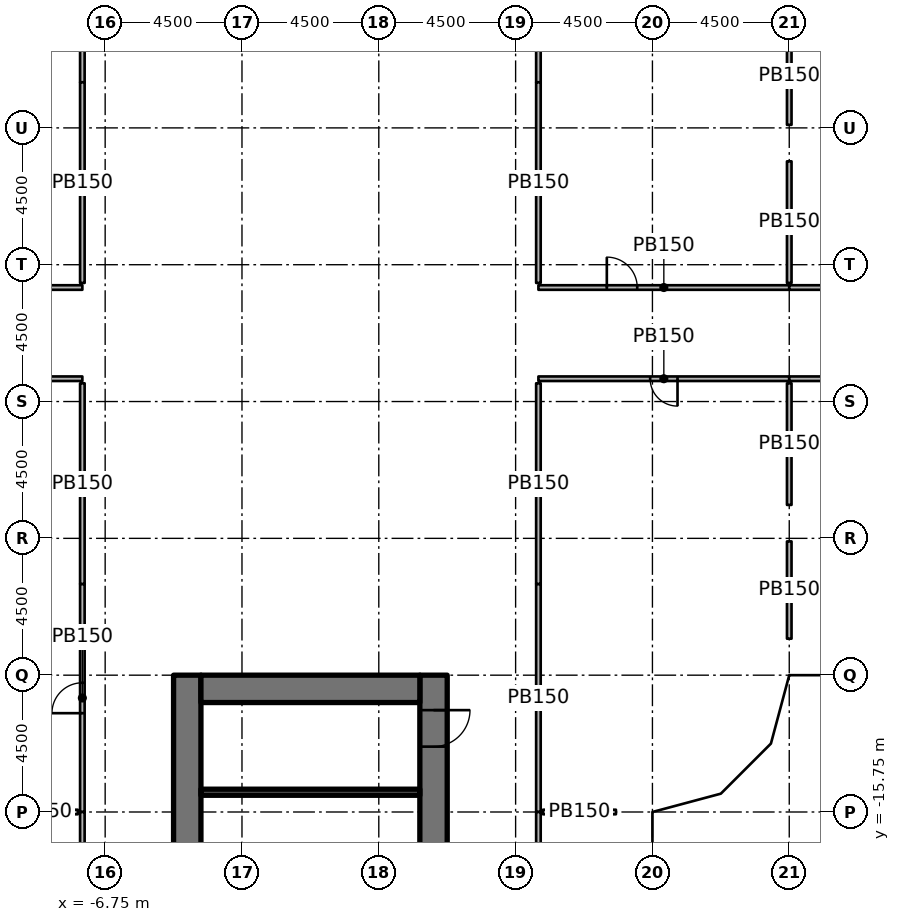
"""IFC4 building model, lengths in metres.
Left out: names, types, materials, properties, quantities, classifications, styles, units other than length and angle.
Written with IfcOpenShell. Run it as: python <this file> out.ifc"""

import sys

from ifc_helpers import new_model, si_unit, direction, frame, frame_2d, origin, origin_2d, place, context, subcontext, project, spatial, rectangle, extrude, element, fill, save


model = new_model("IFC4")
c1 = context("Model", 3, precision=1e-05, world=origin(), true_north=direction((0.0, 1.0)))
c2 = subcontext(c1, "Body", "Model", "MODEL_VIEW")
j1 = project(units=[si_unit("LENGTHUNIT", "METRE"), si_unit("PLANEANGLEUNIT", "RADIAN")], contexts=[c1])
p1 = place(None, origin())
s1 = spatial("IfcSite", under=j1, at=p1, CompositionType="ELEMENT")
p2 = place(p1, origin())
s2 = spatial("IfcBuilding", under=s1, at=p2, CompositionType="ELEMENT")
p3 = place(p2, frame((0.0, 0.0, 22.0)))
s3 = spatial("IfcBuildingStorey", under=s2, at=p3, CompositionType="ELEMENT", Elevation=22.0)
for number, where, z_axis, x_axis in (
    (1, (-6.25, -15.75, 0.0), (0.0, 0.0, 1.0), (1.0, 0.0, 0.0)),
    (2, (-6.25, -10.75, 0.0), (0.0, 0.0, 1.0), (1.0, 0.0, 0.0)),
    (3, (-6.25, -6.25, 0.0), (0.0, 0.0, 1.0), (1.0, 0.0, 0.0)),
    (4, (-6.25, 6.25, 0.0), (0.0, 0.0, 1.0), (1.0, 0.0, 0.0)),
    (5, (6.25, -15.75, 0.0), (0.0, 0.0, 1.0), (1.0, 0.0, 0.0)),
    (6, (6.25, -10.75, 0.0), (0.0, 0.0, 1.0), (1.0, 0.0, 0.0)),
    (7, (6.25, -6.25, 0.0), (0.0, 0.0, 1.0), (1.0, 0.0, 0.0)),
    (8, (6.25, 6.25, 0.0), (0.0, 0.0, 1.0), (1.0, 0.0, 0.0)),
):
    element("IfcColumn", number, at=place(p3, frame(where, z_axis=z_axis, x_axis=x_axis)), inside=s3, PredefinedType="COLUMN", context=c2, shape_type="SweptSolid", body=[
        extrude(rectangle(XDim=1.2, YDim=1.2, at=origin_2d()), origin(), (0.0, 0.0, 1.0), 4.85),
    ])
p4 = place(p3, frame((10.65, -15.15, 0.0), z_axis=(0.0, 0.0, 1.0), x_axis=(1.0, 0.0, 0.0)))
e9 = element("IfcColumn", 9, at=p4, inside=s3, PredefinedType="COLUMN", context=c2, shape_type="SweptSolid", body=[
    extrude(rectangle(XDim=1.2, YDim=1.2, at=origin_2d()), origin(), (0.0, 0.0, 1.0), 4.55),
])
for number, where, z_axis, x_axis in (
    (10, (10.75, -6.25, 0.0), (0.0, 0.0, 1.0), (1.0, 0.0, 0.0)),
    (11, (10.75, 6.25, 0.0), (0.0, 0.0, 1.0), (1.0, 0.0, 0.0)),
):
    element("IfcColumn", number, at=place(p3, frame(where, z_axis=z_axis, x_axis=x_axis)), inside=s3, PredefinedType="COLUMN", context=c2, shape_type="SweptSolid", body=[
        extrude(rectangle(XDim=1.2, YDim=1.2, at=origin_2d()), origin(), (0.0, 0.0, 1.0), 4.85),
    ])
p5 = place(p3, frame((15.15, -10.65, 0.0), z_axis=(0.0, 0.0, 1.0), x_axis=(1.0, 0.0, 0.0)))
e12 = element("IfcColumn", 12, at=p5, inside=s3, PredefinedType="COLUMN", context=c2, shape_type="SweptSolid", body=[
    extrude(rectangle(XDim=1.2, YDim=1.2, at=origin_2d()), origin(), (0.0, 0.0, 1.0), 4.55),
])
for number, where, z_axis, x_axis in (
    (13, (15.75, -6.25, 0.0), (0.0, 0.0, 1.0), (1.0, 0.0, 0.0)),
    (14, (15.75, 6.25, 0.0), (0.0, 0.0, 1.0), (1.0, 0.0, 0.0)),
):
    element("IfcColumn", number, at=place(p3, frame(where, z_axis=z_axis, x_axis=x_axis)), inside=s3, PredefinedType="COLUMN", context=c2, shape_type="SweptSolid", body=[
        extrude(rectangle(XDim=1.2, YDim=1.2, at=origin_2d()), origin(), (0.0, 0.0, 1.0), 4.85),
    ])
p6 = place(p3, frame((-4.05, -11.25, 0.0), z_axis=(0.0, 0.0, 1.0), x_axis=(0.0, -1.0, 0.0)))
e15 = element("IfcWall", 15, at=p6, inside=s3, PredefinedType="SHEAR", context=c2, shape_type="SweptSolid", body=[
    extrude(rectangle(XDim=15.0, YDim=0.9, at=frame_2d((7.5, 0.0))), origin(), (0.0, 0.0, 1.0), 5.0),
])
p7 = place(p6, frame((7.15, 0.0, 0.0)))
e16 = element("IfcOpeningElement", 16, at=p7, cuts=e15, PredefinedType="OPENING", context=c2, shape_type="SweptSolid", body=[
    extrude(rectangle(XDim=1.5, YDim=2.3, at=frame_2d((0.75, 1.15))), frame((0.0, 0.46, 0.0), z_axis=(0.0, -1.0, 0.0), x_axis=(1.0, 0.0, 0.0)), (0.0, 0.0, 1.0), 0.92),
])
p8 = place(p6, frame((5.55, 0.0, 0.0)))
e17 = element("IfcOpeningElement", 17, at=p8, cuts=e15, PredefinedType="OPENING", context=c2, shape_type="SweptSolid", body=[
    extrude(rectangle(XDim=1.2, YDim=2.1, at=frame_2d((0.6, 1.05))), frame((0.0, 0.46, 0.0), z_axis=(0.0, -1.0, 0.0), x_axis=(1.0, 0.0, 0.0)), (0.0, 0.0, 1.0), 0.92),
])
p9 = place(p3, frame((4.05, -11.25, 0.0), z_axis=(0.0, 0.0, 1.0), x_axis=(0.0, -1.0, 0.0)))
e18 = element("IfcWall", 18, at=p9, inside=s3, PredefinedType="SHEAR", context=c2, shape_type="SweptSolid", body=[
    extrude(rectangle(XDim=15.0, YDim=0.9, at=frame_2d((7.5, 0.0))), origin(), (0.0, 0.0, 1.0), 5.0),
])
p10 = place(p9, frame((7.15, 0.0, 0.0)))
e19 = element("IfcOpeningElement", 19, at=p10, cuts=e18, PredefinedType="OPENING", context=c2, shape_type="SweptSolid", body=[
    extrude(rectangle(XDim=1.5, YDim=2.3, at=frame_2d((0.75, 1.15))), frame((0.0, 0.46, 0.0), z_axis=(0.0, -1.0, 0.0), x_axis=(1.0, 0.0, 0.0)), (0.0, 0.0, 1.0), 0.92),
])
p11 = place(p9, frame((13.9, 0.0, 0.0)))
e20 = element("IfcOpeningElement", 20, at=p11, cuts=e18, PredefinedType="OPENING", context=c2, shape_type="SweptSolid", body=[
    extrude(rectangle(XDim=0.9, YDim=2.1, at=frame_2d((0.45, 1.05))), frame((0.0, 0.46, 0.0), z_axis=(0.0, -1.0, 0.0), x_axis=(1.0, 0.0, 0.0)), (0.0, 0.0, 1.0), 0.92),
])
p12 = place(p9, frame((1.15, 0.0, 0.0)))
e21 = element("IfcOpeningElement", 21, at=p12, cuts=e18, PredefinedType="OPENING", context=c2, shape_type="SweptSolid", body=[
    extrude(rectangle(XDim=1.2, YDim=2.1, at=frame_2d((0.6, 1.05))), frame((0.0, 0.46, 0.0), z_axis=(0.0, -1.0, 0.0), x_axis=(1.0, 0.0, 0.0)), (0.0, 0.0, 1.0), 0.92),
])
p13 = place(p3, frame((-3.6, -11.7, 0.0), z_axis=(0.0, 0.0, 1.0), x_axis=(1.0, 0.0, 0.0)))
e22 = element("IfcWall", 22, at=p13, inside=s3, PredefinedType="SHEAR", context=c2, shape_type="SweptSolid", body=[
    extrude(rectangle(XDim=7.2, YDim=0.9, at=frame_2d((3.6, 0.0))), origin(), (0.0, 0.0, 1.0), 5.0),
])
p14 = place(p3, frame((3.6, -15.1, 0.0), z_axis=(0.0, 0.0, 1.0), x_axis=(-1.0, 0.0, 0.0)))
e23 = element("IfcWall", 23, at=p14, inside=s3, PredefinedType="SHEAR", context=c2, shape_type="SweptSolid", body=[
    extrude(rectangle(XDim=7.2, YDim=0.2, at=frame_2d((3.6, 0.0))), origin(), (0.0, 0.0, 1.0), 4.85),
])
p15 = place(p3, frame((7.5, 15.75, 0.0), z_axis=(0.0, 0.0, 1.0), x_axis=(0.0, -1.0, 0.0)))
e24 = element("IfcWall", 24, at=p15, inside=s3, PredefinedType="PARTITIONING", context=c2, shape_type="SweptSolid", body=[
    extrude(rectangle(XDim=7.5, YDim=0.15, at=frame_2d((3.75, 0.0))), origin(), (0.0, 0.0, 1.0), 3.93),
])
p16 = place(p15, frame((3.25, 0.0, 0.0)))
e25 = element("IfcOpeningElement", 25, at=p16, cuts=e24, PredefinedType="OPENING", context=c2, shape_type="SweptSolid", body=[
    extrude(rectangle(XDim=1.0, YDim=2.1, at=frame_2d((0.5, 1.05))), frame((0.0, 0.085, 0.0), z_axis=(0.0, -1.0, 0.0), x_axis=(1.0, 0.0, 0.0)), (0.0, 0.0, 1.0), 0.17),
])
p17 = place(p3, frame((-7.5, 8.25, 0.0), z_axis=(0.0, 0.0, 1.0), x_axis=(0.0, 1.0, 0.0)))
e26 = element("IfcWall", 26, at=p17, inside=s3, PredefinedType="PARTITIONING", context=c2, shape_type="SweptSolid", body=[
    extrude(rectangle(XDim=7.5, YDim=0.15, at=frame_2d((3.75, 0.0))), origin(), (0.0, 0.0, 1.0), 3.93),
])
p18 = place(p17, frame((4.5, 0.0, 0.0)))
e27 = element("IfcOpeningElement", 27, at=p18, cuts=e26, PredefinedType="OPENING", context=c2, shape_type="SweptSolid", body=[
    extrude(rectangle(XDim=1.0, YDim=2.1, at=frame_2d((0.5, 1.05))), frame((0.0, 0.085, 0.0), z_axis=(0.0, -1.0, 0.0), x_axis=(1.0, 0.0, 0.0)), (0.0, 0.0, 1.0), 0.17),
])
p19 = place(p3, frame((7.5, -8.25, 0.0), z_axis=(0.0, 0.0, 1.0), x_axis=(0.0, -1.0, 0.0)))
e28 = element("IfcWall", 28, at=p19, inside=s3, PredefinedType="PARTITIONING", context=c2, shape_type="SweptSolid", body=[
    extrude(rectangle(XDim=7.5, YDim=0.15, at=frame_2d((3.75, 0.0))), origin(), (0.0, 0.0, 1.0), 3.93),
])
p20 = place(p3, frame((7.5, -15.75, 0.0), z_axis=(0.0, 0.0, 1.0), x_axis=(0.0, -1.0, 0.0)))
e29 = element("IfcWall", 29, at=p20, inside=s3, PredefinedType="PARTITIONING", context=c2, shape_type="SweptSolid", body=[
    extrude(rectangle(XDim=16.5, YDim=0.15, at=frame_2d((8.25, 0.0))), origin(), (0.0, 0.0, 1.0), 4.55),
])
p21 = place(p20, frame((7.25, 0.0, 0.0)))
e30 = element("IfcOpeningElement", 30, at=p21, cuts=e29, PredefinedType="OPENING", context=c2, shape_type="SweptSolid", body=[
    extrude(rectangle(XDim=0.9, YDim=2.1, at=frame_2d((0.45, 1.05))), frame((0.0, 0.085, 0.0), z_axis=(0.0, -1.0, 0.0), x_axis=(1.0, 0.0, 0.0)), (0.0, 0.0, 1.0), 0.17),
])
p22 = place(p3, frame((-7.5, -15.75, 0.0), z_axis=(0.0, 0.0, 1.0), x_axis=(0.0, 1.0, 0.0)))
e31 = element("IfcWall", 31, at=p22, inside=s3, PredefinedType="PARTITIONING", context=c2, shape_type="SweptSolid", body=[
    extrude(rectangle(XDim=7.5, YDim=0.15, at=frame_2d((3.75, 0.0))), origin(), (0.0, 0.0, 1.0), 3.93),
])
p23 = place(p22, frame((3.25, 0.0, 0.0)))
e32 = element("IfcOpeningElement", 32, at=p23, cuts=e31, PredefinedType="OPENING", context=c2, shape_type="SweptSolid", body=[
    extrude(rectangle(XDim=1.0, YDim=2.1, at=frame_2d((0.5, 1.05))), frame((0.0, 0.085, 0.0), z_axis=(0.0, -1.0, 0.0), x_axis=(1.0, 0.0, 0.0)), (0.0, 0.0, 1.0), 0.17),
])
p24 = place(p3, frame((-7.5, -32.25, 0.0), z_axis=(0.0, 0.0, 1.0), x_axis=(0.0, 1.0, 0.0)))
e33 = element("IfcWall", 33, at=p24, inside=s3, PredefinedType="PARTITIONING", context=c2, shape_type="SweptSolid", body=[
    extrude(rectangle(XDim=16.5, YDim=0.15, at=frame_2d((8.25, 0.0))), origin(), (0.0, 0.0, 1.0), 4.55),
])
p25 = place(p24, frame((8.25, 0.0, 0.0)))
e34 = element("IfcOpeningElement", 34, at=p25, cuts=e33, PredefinedType="OPENING", context=c2, shape_type="SweptSolid", body=[
    extrude(rectangle(XDim=0.9, YDim=2.1, at=frame_2d((0.45, 1.05))), frame((0.0, 0.085, 0.0), z_axis=(0.0, -1.0, 0.0), x_axis=(1.0, 0.0, 0.0)), (0.0, 0.0, 1.0), 0.17),
])
p26 = place(p3, frame((7.5, 1.5, 0.0), z_axis=(0.0, 0.0, 1.0), x_axis=(1.0, 0.0, 0.0)))
e35 = element("IfcWall", 35, at=p26, inside=s3, PredefinedType="PARTITIONING", context=c2, shape_type="SweptSolid", body=[
    extrude(rectangle(XDim=8.25, YDim=0.15, at=frame_2d((4.125, 0.0))), origin(), (0.0, 0.0, 1.0), 4.063),
])
p27 = place(p26, frame((2.25, 0.0, 0.0)))
e36 = element("IfcOpeningElement", 36, at=p27, cuts=e35, PredefinedType="OPENING", context=c2, shape_type="SweptSolid", body=[
    extrude(rectangle(XDim=1.0, YDim=2.1, at=frame_2d((0.5, 1.05))), frame((0.0, 0.085, 0.0), z_axis=(0.0, -1.0, 0.0), x_axis=(1.0, 0.0, 0.0)), (0.0, 0.0, 1.0), 0.17),
])
p28 = place(p3, frame((15.75, 1.5, 0.0), z_axis=(0.0, 0.0, 1.0), x_axis=(1.0, 0.0, 0.0)))
e37 = element("IfcWall", 37, at=p28, inside=s3, PredefinedType="PARTITIONING", context=c2, shape_type="SweptSolid", body=[
    extrude(rectangle(XDim=21.9, YDim=0.15, at=frame_2d((10.95, 0.0))), origin(), (0.0, 0.0, 1.0), 3.93),
])
p29 = place(p28, frame((10.8, 0.0, 0.0)))
e38 = element("IfcOpeningElement", 38, at=p29, cuts=e37, PredefinedType="OPENING", context=c2, shape_type="SweptSolid", body=[
    extrude(rectangle(XDim=0.9, YDim=2.1, at=frame_2d((0.45, 1.05))), frame((0.0, 0.085, 0.0), z_axis=(0.0, -1.0, 0.0), x_axis=(1.0, 0.0, 0.0)), (0.0, 0.0, 1.0), 0.17),
])
p30 = place(p3, frame((15.75, -1.5, 0.0), z_axis=(0.0, 0.0, 1.0), x_axis=(-1.0, 0.0, 0.0)))
e39 = element("IfcWall", 39, at=p30, inside=s3, PredefinedType="PARTITIONING", context=c2, shape_type="SweptSolid", body=[
    extrude(rectangle(XDim=8.25, YDim=0.15, at=frame_2d((4.125, 0.0))), origin(), (0.0, 0.0, 1.0), 4.063),
])
p31 = place(p30, frame((3.675, 0.0, 0.0)))
e40 = element("IfcOpeningElement", 40, at=p31, cuts=e39, PredefinedType="OPENING", context=c2, shape_type="SweptSolid", body=[
    extrude(rectangle(XDim=0.9, YDim=2.1, at=frame_2d((0.45, 1.05))), frame((0.0, 0.085, 0.0), z_axis=(0.0, -1.0, 0.0), x_axis=(1.0, 0.0, 0.0)), (0.0, 0.0, 1.0), 0.17),
])
p32 = place(p3, frame((37.65, -1.5, 0.0), z_axis=(0.0, 0.0, 1.0), x_axis=(-1.0, 0.0, 0.0)))
e41 = element("IfcWall", 41, at=p32, inside=s3, PredefinedType="PARTITIONING", context=c2, shape_type="SweptSolid", body=[
    extrude(rectangle(XDim=21.9, YDim=0.15, at=frame_2d((10.95, 0.0))), origin(), (0.0, 0.0, 1.0), 3.93),
])
p33 = place(p32, frame((10.2, 0.0, 0.0)))
e42 = element("IfcOpeningElement", 42, at=p33, cuts=e41, PredefinedType="OPENING", context=c2, shape_type="SweptSolid", body=[
    extrude(rectangle(XDim=0.9, YDim=2.1, at=frame_2d((0.45, 1.05))), frame((0.0, 0.085, 0.0), z_axis=(0.0, -1.0, 0.0), x_axis=(1.0, 0.0, 0.0)), (0.0, 0.0, 1.0), 0.17),
])
p34 = place(p3, frame((-15.75, 1.5, 0.0), z_axis=(0.0, 0.0, 1.0), x_axis=(1.0, 0.0, 0.0)))
e43 = element("IfcWall", 43, at=p34, inside=s3, PredefinedType="PARTITIONING", context=c2, shape_type="SweptSolid", body=[
    extrude(rectangle(XDim=8.25, YDim=0.15, at=frame_2d((4.125, 0.0))), origin(), (0.0, 0.0, 1.0), 4.063),
])
p35 = place(p34, frame((2.25, 0.0, 0.0)))
e44 = element("IfcOpeningElement", 44, at=p35, cuts=e43, PredefinedType="OPENING", context=c2, shape_type="SweptSolid", body=[
    extrude(rectangle(XDim=1.0, YDim=2.1, at=frame_2d((0.5, 1.05))), frame((0.0, 0.085, 0.0), z_axis=(0.0, -1.0, 0.0), x_axis=(1.0, 0.0, 0.0)), (0.0, 0.0, 1.0), 0.17),
])
p36 = place(p3, frame((-7.5, -1.5, 0.0), z_axis=(0.0, 0.0, 1.0), x_axis=(-1.0, 0.0, 0.0)))
e45 = element("IfcWall", 45, at=p36, inside=s3, PredefinedType="PARTITIONING", context=c2, shape_type="SweptSolid", body=[
    extrude(rectangle(XDim=8.25, YDim=0.15, at=frame_2d((4.125, 0.0))), origin(), (0.0, 0.0, 1.0), 4.063),
])
p37 = place(p36, frame((2.25, 0.0, 0.0)))
e46 = element("IfcOpeningElement", 46, at=p37, cuts=e45, PredefinedType="OPENING", context=c2, shape_type="SweptSolid", body=[
    extrude(rectangle(XDim=1.0, YDim=2.1, at=frame_2d((0.5, 1.05))), frame((0.0, 0.085, 0.0), z_axis=(0.0, -1.0, 0.0), x_axis=(1.0, 0.0, 0.0)), (0.0, 0.0, 1.0), 0.17),
])
p38 = place(p3, frame((15.75, 10.05, 0.0), z_axis=(0.0, 0.0, 1.0), x_axis=(0.0, -1.0, 0.0)))
e47 = element("IfcWall", 47, at=p38, inside=s3, PredefinedType="PARTITIONING", context=c2, shape_type="SweptSolid", body=[
    extrude(rectangle(XDim=3.2, YDim=0.15, at=frame_2d((1.6, 0.0))), origin(), (0.0, 0.0, 1.0), 4.55),
])
p39 = place(p3, frame((15.75, 5.65, 0.0), z_axis=(0.0, 0.0, 1.0), x_axis=(0.0, -1.0, 0.0)))
e48 = element("IfcWall", 48, at=p39, inside=s3, PredefinedType="PARTITIONING", context=c2, shape_type="SweptSolid", body=[
    extrude(rectangle(XDim=4.0, YDim=0.15, at=frame_2d((2.0, 0.0))), origin(), (0.0, 0.0, 1.0), 4.063),
])
for number, where, z_axis, x_axis in (
    (49, (7.5, 1.65, 0.0), (0.0, 0.0, 1.0), (0.0, 1.0, 0.0)),
    (50, (-7.5, 8.25, 0.0), (0.0, 0.0, 1.0), (0.0, -1.0, 0.0)),
):
    element("IfcWall", number, at=place(p3, frame(where, z_axis=z_axis, x_axis=x_axis)), inside=s3, PredefinedType="PARTITIONING", context=c2, shape_type="SweptSolid", body=[
        extrude(rectangle(XDim=6.6, YDim=0.15, at=frame_2d((3.3, 0.0))), origin(), (0.0, 0.0, 1.0), 3.911),
    ])
p40 = place(p3, frame((15.75, -1.65, 0.0), z_axis=(0.0, 0.0, 1.0), x_axis=(0.0, -1.0, 0.0)))
e51 = element("IfcWall", 51, at=p40, inside=s3, PredefinedType="PARTITIONING", context=c2, shape_type="SweptSolid", body=[
    extrude(rectangle(XDim=4.0, YDim=0.15, at=frame_2d((2.0, 0.0))), origin(), (0.0, 0.0, 1.0), 4.063),
])
p41 = place(p3, frame((15.75, -6.85, 0.0), z_axis=(0.0, 0.0, 1.0), x_axis=(0.0, -1.0, 0.0)))
e52 = element("IfcWall", 52, at=p41, inside=s3, PredefinedType="PARTITIONING", context=c2, shape_type="SweptSolid", body=[
    extrude(rectangle(XDim=3.2, YDim=0.15, at=frame_2d((1.6, 0.0))), origin(), (0.0, 0.0, 1.0), 4.55),
])
p42 = place(p3, frame((10.05, -15.75, 0.0), z_axis=(0.0, 0.0, 1.0), x_axis=(-1.0, 0.0, 0.0)))
e53 = element("IfcWall", 53, at=p42, inside=s3, PredefinedType="PARTITIONING", context=c2, shape_type="SweptSolid", body=[
    extrude(rectangle(XDim=2.4, YDim=0.15, at=frame_2d((1.2, 0.0))), origin(), (0.0, 0.0, 1.0), 4.55),
])
p43 = place(p3, frame((7.5, -8.25, 0.0), z_axis=(0.0, 0.0, 1.0), x_axis=(0.0, 1.0, 0.0)))
e54 = element("IfcWall", 54, at=p43, inside=s3, PredefinedType="PARTITIONING", context=c2, shape_type="SweptSolid", body=[
    extrude(rectangle(XDim=6.6, YDim=0.15, at=frame_2d((3.3, 0.0))), origin(), (0.0, 0.0, 1.0), 3.911),
])
p44 = place(p3, frame((-7.65, -15.75, 0.0), z_axis=(0.0, 0.0, 1.0), x_axis=(-1.0, 0.0, 0.0)))
e55 = element("IfcWall", 55, at=p44, inside=s3, PredefinedType="PARTITIONING", context=c2, shape_type="SweptSolid", body=[
    extrude(rectangle(XDim=2.4, YDim=0.15, at=frame_2d((1.2, 0.0))), origin(), (0.0, 0.0, 1.0), 4.55),
])
p45 = place(p3, frame((-7.5, -1.65, 0.0), z_axis=(0.0, 0.0, 1.0), x_axis=(0.0, -1.0, 0.0)))
e56 = element("IfcWall", 56, at=p45, inside=s3, PredefinedType="PARTITIONING", context=c2, shape_type="SweptSolid", body=[
    extrude(rectangle(XDim=6.6, YDim=0.15, at=frame_2d((3.3, 0.0))), origin(), (0.0, 0.0, 1.0), 3.911),
])
p46 = place(p12, origin())
e57 = element("IfcDoor", 57, at=p46, inside=s3, OperationType="SINGLE_SWING_RIGHT", PredefinedType="DOOR", context=c2, shape_type="SweptSolid", body=[
    extrude(rectangle(XDim=1.2, YDim=2.1, at=frame_2d((0.6, 1.05))), frame((0.0, 0.025, 0.0), z_axis=(0.0, -1.0, 0.0), x_axis=(1.0, 0.0, 0.0)), (0.0, 0.0, 1.0), 0.05),
])
fill(e21, e57)
p47 = place(p23, origin())
e58 = element("IfcDoor", 58, at=p47, inside=s3, OperationType="SINGLE_SWING_LEFT", PredefinedType="DOOR", context=c2, shape_type="SweptSolid", body=[
    extrude(rectangle(XDim=1.0, YDim=2.1, at=frame_2d((0.5, 1.05))), frame((0.0, 0.025, 0.0), z_axis=(0.0, -1.0, 0.0), x_axis=(1.0, 0.0, 0.0)), (0.0, 0.0, 1.0), 0.05),
])
fill(e32, e58)
p48 = place(p27, origin())
e59 = element("IfcDoor", 59, at=p48, inside=s3, OperationType="SINGLE_SWING_LEFT", PredefinedType="DOOR", context=c2, shape_type="SweptSolid", body=[
    extrude(rectangle(XDim=1.0, YDim=2.1, at=frame_2d((0.5, 1.05))), frame((0.0, 0.025, 0.0), z_axis=(0.0, -1.0, 0.0), x_axis=(1.0, 0.0, 0.0)), (0.0, 0.0, 1.0), 0.05),
])
fill(e36, e59)
p49 = place(p31, origin())
e60 = element("IfcDoor", 60, at=p49, inside=s3, OperationType="SINGLE_SWING_LEFT", PredefinedType="DOOR", context=c2, shape_type="SweptSolid", body=[
    extrude(rectangle(XDim=0.9, YDim=2.1, at=frame_2d((0.45, 1.05))), frame((0.0, 0.025, 0.0), z_axis=(0.0, -1.0, 0.0), x_axis=(1.0, 0.0, 0.0)), (0.0, 0.0, 1.0), 0.05),
])
fill(e40, e60)
save(model, sys.argv[1])
